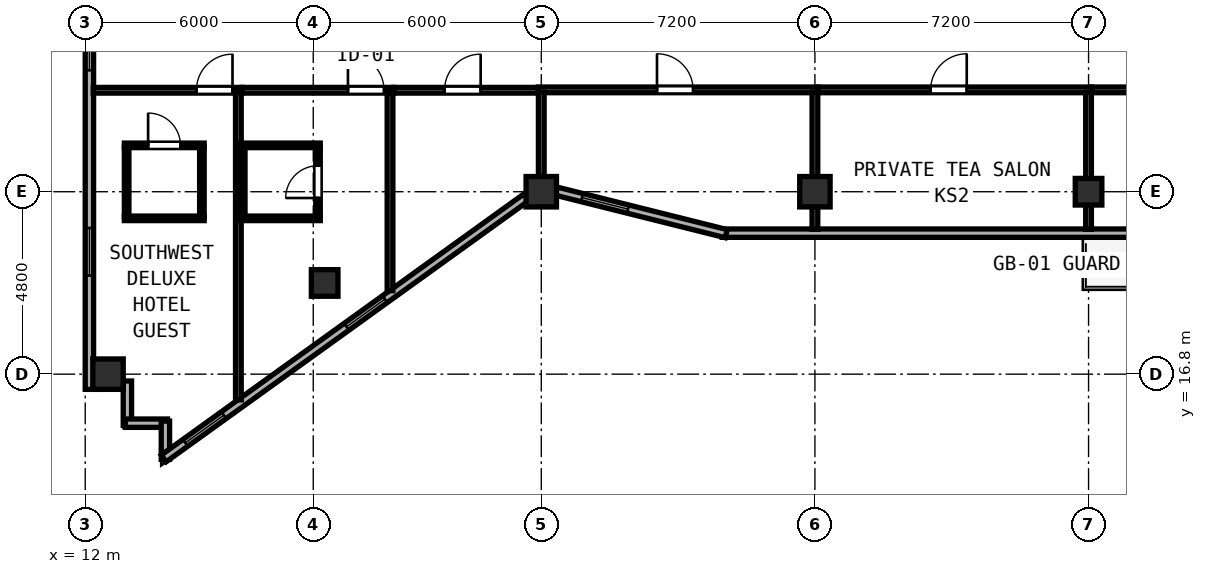
"""IFC4 building model, lengths in metres.
Left out: names, types, materials, properties, quantities, classifications, styles, units other than length and angle.
Written with IfcOpenShell. Run it as: python <this file> out.ifc"""

import sys

from ifc_helpers import new_model, si_unit, direction, frame, frame_2d, origin, origin_2d, place, context, subcontext, project, spatial, rectangle, hollow_rectangle, extrude, element, fill, save


model = new_model("IFC4")
c1 = context("Model", 3, precision=1e-05, world=origin(), true_north=direction((0.0, 1.0)))
c2 = subcontext(c1, "Body", "Model", "MODEL_VIEW")
j1 = project(units=[si_unit("LENGTHUNIT", "METRE"), si_unit("PLANEANGLEUNIT", "RADIAN")], contexts=[c1])
p1 = place(None, origin())
s1 = spatial("IfcSite", under=j1, at=p1, CompositionType="ELEMENT")
p2 = place(p1, origin())
s2 = spatial("IfcBuilding", under=s1, at=p2, CompositionType="ELEMENT")
p3 = place(p2, frame((0.0, 0.0, 269.85)))
s3 = spatial("IfcBuildingStorey", under=s2, at=p3, CompositionType="ELEMENT", Elevation=269.85)
for number, where, z_axis, x_axis in (
    (1, (24.0, 21.6, 0.0), (0.0, 0.0, 1.0), (1.0, 0.0, 0.0)),
    (2, (31.2, 21.6, 0.0), (0.0, 0.0, 1.0), (1.0, 0.0, 0.0)),
    (3, (12.6, 16.8, 0.0), (0.0, 0.0, 1.0), (1.0, 0.0, 0.0)),
):
    element("IfcColumn", number, at=place(p3, frame(where, z_axis=z_axis, x_axis=x_axis)), inside=s3, PredefinedType="COLUMN", context=c2, shape_type="SweptSolid", body=[
        extrude(hollow_rectangle(XDim=0.8, YDim=0.8, WallThickness=0.03, at=origin_2d()), origin(), (0.0, 0.0, 1.0), 3.85),
    ])
for number, where, z_axis, x_axis in (
    (4, (38.4, 21.6, 0.0), (0.0, 0.0, 1.0), (1.0, 0.0, 0.0)),
    (5, (18.3, 19.2, 0.0), (0.0, 0.0, 1.0), (1.0, 0.0, 0.0)),
):
    element("IfcColumn", number, at=place(p3, frame(where, z_axis=z_axis, x_axis=x_axis)), inside=s3, PredefinedType="COLUMN", context=c2, shape_type="SweptSolid", body=[
        extrude(hollow_rectangle(XDim=0.7, YDim=0.7, WallThickness=0.026, at=origin_2d()), origin(), (0.0, 0.0, 1.0), 3.85),
    ])
p4 = place(p3, frame((28.759, 20.51, 0.0), z_axis=(0.0, 0.0, 1.0), x_axis=(1.0, 0.0, 0.0)))
e6 = element("IfcWall", 6, at=p4, inside=s3, PredefinedType="SOLIDWALL", context=c2, shape_type="SweptSolid", body=[
    extrude(rectangle(XDim=19.283, YDim=0.22, at=frame_2d((9.642, 0.0))), origin(), (0.0, 0.0, 1.0), 3.67),
])
p5 = place(p4, frame((15.641, 0.0, 0.0), z_axis=(0.0, 0.0, 1.0), x_axis=(-1.0, 0.0, 0.0)))
e7 = element("IfcOpeningElement", 7, at=p5, cuts=e6, PredefinedType="OPENING", context=c2, shape_type="SweptSolid", body=[
    extrude(rectangle(XDim=1.2, YDim=2.15, at=frame_2d((0.6, 1.075))), frame((0.0, 0.12, 0.0), z_axis=(0.0, -1.0, 0.0), x_axis=(1.0, 0.0, 0.0)), (0.0, 0.0, 1.0), 0.24),
])
p6 = place(p3, frame((12.11, 37.545, 0.0), z_axis=(0.0, 0.0, 1.0), x_axis=(0.0, -1.0, 0.0)))
e8 = element("IfcWall", 8, at=p6, inside=s3, PredefinedType="SOLIDWALL", context=c2, shape_type="SweptSolid", body=[
    extrude(rectangle(XDim=21.145, YDim=0.22, at=frame_2d((10.573, 0.0))), origin(), (0.0, 0.0, 1.0), 3.67),
])
p7 = place(p6, frame((0.7, 0.0, 0.85)))
e9 = element("IfcOpeningElement", 9, at=p7, cuts=e8, PredefinedType="OPENING", context=c2, shape_type="SweptSolid", body=[
    extrude(rectangle(XDim=1.25, YDim=1.95, at=frame_2d((0.625, 0.975))), frame((0.0, 0.12, 0.0), z_axis=(0.0, -1.0, 0.0), x_axis=(1.0, 0.0, 0.0)), (0.0, 0.0, 1.0), 0.24),
])
p8 = place(p6, frame((6.1, 0.0, 0.85)))
e10 = element("IfcOpeningElement", 10, at=p8, cuts=e8, PredefinedType="OPENING", context=c2, shape_type="SweptSolid", body=[
    extrude(rectangle(XDim=1.25, YDim=1.95, at=frame_2d((0.625, 0.975))), frame((0.0, 0.12, 0.0), z_axis=(0.0, -1.0, 0.0), x_axis=(1.0, 0.0, 0.0)), (0.0, 0.0, 1.0), 0.24),
])
p9 = place(p6, frame((11.5, 0.0, 0.85)))
e11 = element("IfcOpeningElement", 11, at=p9, cuts=e8, PredefinedType="OPENING", context=c2, shape_type="SweptSolid", body=[
    extrude(rectangle(XDim=1.25, YDim=1.95, at=frame_2d((0.625, 0.975))), frame((0.0, 0.12, 0.0), z_axis=(0.0, -1.0, 0.0), x_axis=(1.0, 0.0, 0.0)), (0.0, 0.0, 1.0), 0.24),
])
p10 = place(p6, frame((16.9, 0.0, 0.85)))
e12 = element("IfcOpeningElement", 12, at=p10, cuts=e8, PredefinedType="OPENING", context=c2, shape_type="SweptSolid", body=[
    extrude(rectangle(XDim=1.25, YDim=1.95, at=frame_2d((0.625, 0.975))), frame((0.0, 0.12, 0.0), z_axis=(0.0, -1.0, 0.0), x_axis=(1.0, 0.0, 0.0)), (0.0, 0.0, 1.0), 0.24),
])
p11 = place(p3, frame((13.11, 16.62, 0.0), z_axis=(0.0, 0.0, 1.0), x_axis=(0.0, -1.0, 0.0)))
e13 = element("IfcWall", 13, at=p11, inside=s3, PredefinedType="SOLIDWALL", context=c2, shape_type="SweptSolid", body=[
    extrude(rectangle(XDim=1.165, YDim=0.22, at=frame_2d((0.583, 0.0))), origin(), (0.0, 0.0, 1.0), 3.67),
])
p12 = place(p3, frame((13.055, 15.51, 0.0), z_axis=(0.0, 0.0, 1.0), x_axis=(1.0, 0.0, 0.0)))
e14 = element("IfcWall", 14, at=p12, inside=s3, PredefinedType="SOLIDWALL", context=c2, shape_type="SweptSolid", body=[
    extrude(rectangle(XDim=1.11, YDim=0.22, at=frame_2d((0.555, 0.0))), origin(), (0.0, 0.0, 1.0), 3.67),
])
p13 = place(p3, frame((14.11, 15.565, 0.0), z_axis=(0.0, 0.0, 1.0), x_axis=(0.0, -1.0, 0.0)))
e15 = element("IfcWall", 15, at=p13, inside=s3, PredefinedType="SOLIDWALL", context=c2, shape_type="SweptSolid", body=[
    extrude(rectangle(XDim=1.005, YDim=0.22, at=frame_2d((0.502, 0.0))), origin(), (0.0, 0.0, 1.0), 3.67),
])
p14 = place(p3, frame((14.065, 14.583, 0.0), z_axis=(0.0, 0.0, 1.0), x_axis=(0.811523708458, 0.584319493608, 0.0)))
e16 = element("IfcWall", 16, at=p14, inside=s3, PredefinedType="SOLIDWALL", context=c2, shape_type="SweptSolid", body=[
    extrude(rectangle(XDim=11.759, YDim=0.22, at=frame_2d((5.879, 0.0))), origin(), (0.0, 0.0, 1.0), 3.315),
])
p15 = place(p14, frame((0.7, 0.0, 0.85)))
e17 = element("IfcOpeningElement", 17, at=p15, cuts=e16, PredefinedType="OPENING", context=c2, shape_type="SweptSolid", body=[
    extrude(rectangle(XDim=1.25, YDim=1.95, at=frame_2d((0.625, 0.975))), frame((0.0, 0.12, 0.0), z_axis=(0.0, -1.0, 0.0), x_axis=(1.0, 0.0, 0.0)), (0.0, 0.0, 1.0), 0.24),
])
p16 = place(p14, frame((5.926, 0.0, 0.85)))
e18 = element("IfcOpeningElement", 18, at=p16, cuts=e16, PredefinedType="OPENING", context=c2, shape_type="SweptSolid", body=[
    extrude(rectangle(XDim=1.25, YDim=1.95, at=frame_2d((0.625, 0.975))), frame((0.0, 0.12, 0.0), z_axis=(0.0, -1.0, 0.0), x_axis=(1.0, 0.0, 0.0)), (0.0, 0.0, 1.0), 0.24),
])
p17 = place(p3, frame((24.392, 21.615, 0.0), z_axis=(0.0, 0.0, 1.0), x_axis=(0.970133159038, -0.242572986408, 0.0)))
e19 = element("IfcWall", 19, at=p17, inside=s3, PredefinedType="SOLIDWALL", context=c2, shape_type="SweptSolid", body=[
    extrude(rectangle(XDim=4.613, YDim=0.22, at=frame_2d((2.306, 0.0))), origin(), (0.0, 0.0, 1.0), 3.315),
])
p18 = place(p17, frame((0.7, 0.0, 0.85)))
e20 = element("IfcOpeningElement", 20, at=p18, cuts=e19, PredefinedType="OPENING", context=c2, shape_type="SweptSolid", body=[
    extrude(rectangle(XDim=1.25, YDim=1.95, at=frame_2d((0.625, 0.975))), frame((0.0, 0.12, 0.0), z_axis=(0.0, -1.0, 0.0), x_axis=(1.0, 0.0, 0.0)), (0.0, 0.0, 1.0), 0.24),
])
p19 = place(p3, frame((23.92, 24.28, 0.0), z_axis=(0.0, 0.0, 1.0), x_axis=(1.0, 0.0, 0.0)))
e21 = element("IfcWall", 21, at=p19, inside=s3, PredefinedType="PARTITIONING", context=c2, shape_type="SweptSolid", body=[
    extrude(rectangle(XDim=7.36, YDim=0.15, at=frame_2d((3.68, 0.0))), origin(), (0.0, 0.0, 1.0), 3.67),
])
p20 = place(p19, frame((4.075, 0.0, 0.0), z_axis=(0.0, 0.0, 1.0), x_axis=(-1.0, 0.0, 0.0)))
e22 = element("IfcOpeningElement", 22, at=p20, cuts=e21, PredefinedType="OPENING", context=c2, shape_type="SweptSolid", body=[
    extrude(rectangle(XDim=0.95, YDim=2.12, at=frame_2d((0.475, 1.06))), frame((0.0, 0.085, 0.0), z_axis=(0.0, -1.0, 0.0), x_axis=(1.0, 0.0, 0.0)), (0.0, 0.0, 1.0), 0.17),
])
p21 = place(p3, frame((24.0, 21.819, 0.0), z_axis=(0.0, 0.0, 1.0), x_axis=(0.0, 1.0, 0.0)))
e23 = element("IfcWall", 23, at=p21, inside=s3, PredefinedType="PARTITIONING", context=c2, shape_type="SweptSolid", body=[
    extrude(rectangle(XDim=2.401, YDim=0.15, at=frame_2d((1.201, 0.0))), origin(), (0.0, 0.0, 1.0), 3.315),
])
p22 = place(p3, frame((31.2, 20.612, 0.0), z_axis=(0.0, 0.0, 1.0), x_axis=(0.0, 1.0, 0.0)))
e24 = element("IfcWall", 24, at=p22, inside=s3, PredefinedType="PARTITIONING", context=c2, shape_type="SweptSolid", body=[
    extrude(rectangle(XDim=3.608, YDim=0.15, at=frame_2d((1.804, 0.0))), origin(), (0.0, 0.0, 1.0), 3.155),
])
p23 = place(p3, frame((31.282, 24.28, 0.0), z_axis=(0.0, 0.0, 1.0), x_axis=(1.0, 0.0, 0.0)))
e25 = element("IfcWall", 25, at=p23, inside=s3, PredefinedType="PARTITIONING", context=c2, shape_type="SweptSolid", body=[
    extrude(rectangle(XDim=7.198, YDim=0.15, at=frame_2d((3.599, 0.0))), origin(), (0.0, 0.0, 1.0), 3.67),
])
p24 = place(p23, frame((3.913, 0.0, 0.0), z_axis=(0.0, 0.0, 1.0), x_axis=(-1.0, 0.0, 0.0)))
e26 = element("IfcOpeningElement", 26, at=p24, cuts=e25, PredefinedType="OPENING", context=c2, shape_type="SweptSolid", body=[
    extrude(rectangle(XDim=0.95, YDim=2.12, at=frame_2d((0.475, 1.06))), frame((0.0, 0.085, 0.0), z_axis=(0.0, -1.0, 0.0), x_axis=(1.0, 0.0, 0.0)), (0.0, 0.0, 1.0), 0.17),
])
p25 = place(p3, frame((38.4, 20.612, 0.0), z_axis=(0.0, 0.0, 1.0), x_axis=(0.0, 1.0, 0.0)))
e27 = element("IfcWall", 27, at=p25, inside=s3, PredefinedType="PARTITIONING", context=c2, shape_type="SweptSolid", body=[
    extrude(rectangle(XDim=3.608, YDim=0.15, at=frame_2d((1.804, 0.0))), origin(), (0.0, 0.0, 1.0), 3.155),
])
p26 = place(p3, frame((38.482, 24.28, 0.0), z_axis=(0.0, 0.0, 1.0), x_axis=(1.0, 0.0, 0.0)))
e28 = element("IfcWall", 28, at=p26, inside=s3, PredefinedType="PARTITIONING", context=c2, shape_type="SweptSolid", body=[
    extrude(rectangle(XDim=14.106, YDim=0.15, at=frame_2d((7.053, 0.0))), origin(), (0.0, 0.0, 1.0), 3.67),
])
p27 = place(p26, frame((5.618, 0.0, 0.0), z_axis=(0.0, 0.0, 1.0), x_axis=(-1.0, 0.0, 0.0)))
e29 = element("IfcOpeningElement", 29, at=p27, cuts=e28, PredefinedType="OPENING", context=c2, shape_type="SweptSolid", body=[
    extrude(rectangle(XDim=0.95, YDim=2.12, at=frame_2d((0.475, 1.06))), frame((0.0, 0.085, 0.0), z_axis=(0.0, -1.0, 0.0), x_axis=(1.0, 0.0, 0.0)), (0.0, 0.0, 1.0), 0.17),
])
p28 = place(p3, frame((12.212, 24.27, 0.0), z_axis=(0.0, 0.0, 1.0), x_axis=(1.0, 0.0, 0.0)))
e30 = element("IfcWall", 30, at=p28, inside=s3, PredefinedType="PARTITIONING", context=c2, shape_type="SweptSolid", body=[
    extrude(rectangle(XDim=3.918, YDim=0.15, at=frame_2d((1.959, 0.0))), origin(), (0.0, 0.0, 1.0), 3.67),
])
p29 = place(p28, frame((3.663, 0.0, 0.0), z_axis=(0.0, 0.0, 1.0), x_axis=(-1.0, 0.0, 0.0)))
e31 = element("IfcOpeningElement", 31, at=p29, cuts=e30, PredefinedType="OPENING", context=c2, shape_type="SweptSolid", body=[
    extrude(rectangle(XDim=0.95, YDim=2.15, at=frame_2d((0.475, 1.075))), frame((0.0, 0.085, 0.0), z_axis=(0.0, -1.0, 0.0), x_axis=(1.0, 0.0, 0.0)), (0.0, 0.0, 1.0), 0.17),
])
p30 = place(p3, frame((16.03, 16.123, 0.0), z_axis=(0.0, 0.0, 1.0), x_axis=(0.0, 1.0, 0.0)))
e32 = element("IfcWall", 32, at=p30, inside=s3, PredefinedType="PARTITIONING", context=c2, shape_type="SweptSolid", body=[
    extrude(rectangle(XDim=8.087, YDim=0.15, at=frame_2d((4.043, 0.0))), origin(), (0.0, 0.0, 1.0), 3.67),
])
p31 = place(p3, frame((13.03, 22.82, 0.0), z_axis=(0.0, 0.0, 1.0), x_axis=(1.0, 0.0, 0.0)))
e33 = element("IfcWall", 33, at=p31, inside=s3, PredefinedType="PARTITIONING", context=c2, shape_type="SweptSolid", body=[
    extrude(rectangle(XDim=2.1, YDim=0.12, at=frame_2d((1.05, 0.0))), origin(), (0.0, 0.0, 1.0), 3.67),
])
p32 = place(p31, frame((1.475, 0.0, 0.0), z_axis=(0.0, 0.0, 1.0), x_axis=(-1.0, 0.0, 0.0)))
e34 = element("IfcOpeningElement", 34, at=p32, cuts=e33, PredefinedType="OPENING", context=c2, shape_type="SweptSolid", body=[
    extrude(rectangle(XDim=0.85, YDim=2.1, at=frame_2d((0.425, 1.05))), frame((0.0, 0.07, 0.0), z_axis=(0.0, -1.0, 0.0), x_axis=(1.0, 0.0, 0.0)), (0.0, 0.0, 1.0), 0.14),
])
p33 = place(p3, frame((13.03, 20.9, 0.0), z_axis=(0.0, 0.0, 1.0), x_axis=(1.0, 0.0, 0.0)))
e35 = element("IfcWall", 35, at=p33, inside=s3, PredefinedType="PARTITIONING", context=c2, shape_type="SweptSolid", body=[
    extrude(rectangle(XDim=2.1, YDim=0.12, at=frame_2d((1.05, 0.0))), origin(), (0.0, 0.0, 1.0), 3.67),
])
for number, where, z_axis, x_axis in (
    (36, (13.09, 20.945, 0.0), (0.0, 0.0, 1.0), (0.0, 1.0, 0.0)),
    (37, (15.07, 20.945, 0.0), (0.0, 0.0, 1.0), (0.0, 1.0, 0.0)),
):
    element("IfcWall", number, at=place(p3, frame(where, z_axis=z_axis, x_axis=x_axis)), inside=s3, PredefinedType="PARTITIONING", context=c2, shape_type="SweptSolid", body=[
        extrude(rectangle(XDim=1.83, YDim=0.12, at=frame_2d((0.915, 0.0))), origin(), (0.0, 0.0, 1.0), 3.67),
    ])
p34 = place(p3, frame((16.132, 24.27, 0.0), z_axis=(0.0, 0.0, 1.0), x_axis=(1.0, 0.0, 0.0)))
e38 = element("IfcWall", 38, at=p34, inside=s3, PredefinedType="PARTITIONING", context=c2, shape_type="SweptSolid", body=[
    extrude(rectangle(XDim=3.988, YDim=0.15, at=frame_2d((1.994, 0.0))), origin(), (0.0, 0.0, 1.0), 3.67),
])
p35 = place(p34, frame((3.731, 0.0, 0.0), z_axis=(0.0, 0.0, 1.0), x_axis=(-1.0, 0.0, 0.0)))
e39 = element("IfcOpeningElement", 39, at=p35, cuts=e38, PredefinedType="OPENING", context=c2, shape_type="SweptSolid", body=[
    extrude(rectangle(XDim=0.95, YDim=2.15, at=frame_2d((0.475, 1.075))), frame((0.0, 0.085, 0.0), z_axis=(0.0, -1.0, 0.0), x_axis=(1.0, 0.0, 0.0)), (0.0, 0.0, 1.0), 0.17),
])
p36 = place(p3, frame((20.02, 18.996, 0.0), z_axis=(0.0, 0.0, 1.0), x_axis=(0.0, 1.0, 0.0)))
e40 = element("IfcWall", 40, at=p36, inside=s3, PredefinedType="PARTITIONING", context=c2, shape_type="SweptSolid", body=[
    extrude(rectangle(XDim=5.214, YDim=0.15, at=frame_2d((2.607, 0.0))), origin(), (0.0, 0.0, 1.0), 3.67),
])
for number, where, z_axis, x_axis in (
    (41, (16.09, 22.82, 0.0), (0.0, 0.0, 1.0), (1.0, 0.0, 0.0)),
    (42, (16.09, 20.9, 0.0), (0.0, 0.0, 1.0), (1.0, 0.0, 0.0)),
):
    element("IfcWall", number, at=place(p3, frame(where, z_axis=z_axis, x_axis=x_axis)), inside=s3, PredefinedType="PARTITIONING", context=c2, shape_type="SweptSolid", body=[
        extrude(rectangle(XDim=2.095, YDim=0.12, at=frame_2d((1.047, 0.0))), origin(), (0.0, 0.0, 1.0), 3.67),
    ])
p37 = place(p3, frame((16.145, 20.945, 0.0), z_axis=(0.0, 0.0, 1.0), x_axis=(0.0, 1.0, 0.0)))
e43 = element("IfcWall", 43, at=p37, inside=s3, PredefinedType="PARTITIONING", context=c2, shape_type="SweptSolid", body=[
    extrude(rectangle(XDim=1.83, YDim=0.12, at=frame_2d((0.915, 0.0))), origin(), (0.0, 0.0, 1.0), 3.67),
])
p38 = place(p3, frame((18.125, 20.945, 0.0), z_axis=(0.0, 0.0, 1.0), x_axis=(0.0, 1.0, 0.0)))
e44 = element("IfcWall", 44, at=p38, inside=s3, PredefinedType="PARTITIONING", context=c2, shape_type="SweptSolid", body=[
    extrude(rectangle(XDim=1.83, YDim=0.12, at=frame_2d((0.915, 0.0))), origin(), (0.0, 0.0, 1.0), 3.67),
])
p39 = place(p38, frame((0.49, 0.0, 0.0)))
e45 = element("IfcOpeningElement", 45, at=p39, cuts=e44, PredefinedType="OPENING", context=c2, shape_type="SweptSolid", body=[
    extrude(rectangle(XDim=0.85, YDim=2.1, at=frame_2d((0.425, 1.05))), frame((0.0, 0.07, 0.0), z_axis=(0.0, -1.0, 0.0), x_axis=(1.0, 0.0, 0.0)), (0.0, 0.0, 1.0), 0.14),
])
p40 = place(p3, frame((20.122, 24.27, 0.0), z_axis=(0.0, 0.0, 1.0), x_axis=(1.0, 0.0, 0.0)))
e46 = element("IfcWall", 46, at=p40, inside=s3, PredefinedType="PARTITIONING", context=c2, shape_type="SweptSolid", body=[
    extrude(rectangle(XDim=3.796, YDim=0.15, at=frame_2d((1.898, 0.0))), origin(), (0.0, 0.0, 1.0), 3.67),
])
p41 = place(p40, frame((2.283, 0.0, 0.0), z_axis=(0.0, 0.0, 1.0), x_axis=(-1.0, 0.0, 0.0)))
e47 = element("IfcOpeningElement", 47, at=p41, cuts=e46, PredefinedType="OPENING", context=c2, shape_type="SweptSolid", body=[
    extrude(rectangle(XDim=0.95, YDim=2.12, at=frame_2d((0.475, 1.06))), frame((0.0, 0.085, 0.0), z_axis=(0.0, -1.0, 0.0), x_axis=(1.0, 0.0, 0.0)), (0.0, 0.0, 1.0), 0.17),
])
p42 = place(p9, origin())
e48 = element("IfcWindow", 48, at=p42, inside=s3, PartitioningType="SINGLE_PANEL", PredefinedType="WINDOW", context=c2, shape_type="SweptSolid", body=[
    extrude(rectangle(XDim=1.25, YDim=1.95, at=frame_2d((0.625, 0.975))), frame((0.0, 0.03, 0.0), z_axis=(0.0, -1.0, 0.0), x_axis=(1.0, 0.0, 0.0)), (0.0, 0.0, 1.0), 0.06),
])
fill(e11, e48)
p43 = place(p10, origin())
e49 = element("IfcWindow", 49, at=p43, inside=s3, PartitioningType="SINGLE_PANEL", PredefinedType="WINDOW", context=c2, shape_type="SweptSolid", body=[
    extrude(rectangle(XDim=1.25, YDim=1.95, at=frame_2d((0.625, 0.975))), frame((0.0, 0.03, 0.0), z_axis=(0.0, -1.0, 0.0), x_axis=(1.0, 0.0, 0.0)), (0.0, 0.0, 1.0), 0.06),
])
fill(e12, e49)
p44 = place(p15, origin())
e50 = element("IfcWindow", 50, at=p44, inside=s3, PartitioningType="SINGLE_PANEL", PredefinedType="WINDOW", context=c2, shape_type="SweptSolid", body=[
    extrude(rectangle(XDim=1.25, YDim=1.95, at=frame_2d((0.625, 0.975))), frame((0.0, 0.03, 0.0), z_axis=(0.0, -1.0, 0.0), x_axis=(1.0, 0.0, 0.0)), (0.0, 0.0, 1.0), 0.06),
])
fill(e17, e50)
p45 = place(p16, origin())
e51 = element("IfcWindow", 51, at=p45, inside=s3, PartitioningType="SINGLE_PANEL", PredefinedType="WINDOW", context=c2, shape_type="SweptSolid", body=[
    extrude(rectangle(XDim=1.25, YDim=1.95, at=frame_2d((0.625, 0.975))), frame((0.0, 0.03, 0.0), z_axis=(0.0, -1.0, 0.0), x_axis=(1.0, 0.0, 0.0)), (0.0, 0.0, 1.0), 0.06),
])
fill(e18, e51)
p46 = place(p18, origin())
e52 = element("IfcWindow", 52, at=p46, inside=s3, PartitioningType="SINGLE_PANEL", PredefinedType="WINDOW", context=c2, shape_type="SweptSolid", body=[
    extrude(rectangle(XDim=1.25, YDim=1.95, at=frame_2d((0.625, 0.975))), frame((0.0, 0.03, 0.0), z_axis=(0.0, -1.0, 0.0), x_axis=(1.0, 0.0, 0.0)), (0.0, 0.0, 1.0), 0.06),
])
fill(e20, e52)
p47 = place(p20, origin())
e53 = element("IfcDoor", 53, at=p47, inside=s3, OperationType="SINGLE_SWING_RIGHT", PredefinedType="DOOR", context=c2, shape_type="SweptSolid", body=[
    extrude(rectangle(XDim=0.95, YDim=2.12, at=frame_2d((0.475, 1.06))), frame((0.0, 0.025, 0.0), z_axis=(0.0, -1.0, 0.0), x_axis=(1.0, 0.0, 0.0)), (0.0, 0.0, 1.0), 0.05),
])
fill(e22, e53)
p48 = place(p24, origin())
e54 = element("IfcDoor", 54, at=p48, inside=s3, OperationType="SINGLE_SWING_LEFT", PredefinedType="DOOR", context=c2, shape_type="SweptSolid", body=[
    extrude(rectangle(XDim=0.95, YDim=2.12, at=frame_2d((0.475, 1.06))), frame((0.0, 0.025, 0.0), z_axis=(0.0, -1.0, 0.0), x_axis=(1.0, 0.0, 0.0)), (0.0, 0.0, 1.0), 0.05),
])
fill(e26, e54)
p49 = place(p29, origin())
e55 = element("IfcDoor", 55, at=p49, inside=s3, OperationType="SINGLE_SWING_LEFT", PredefinedType="DOOR", context=c2, shape_type="SweptSolid", body=[
    extrude(rectangle(XDim=0.95, YDim=2.15, at=frame_2d((0.475, 1.075))), frame((0.0, 0.025, 0.0), z_axis=(0.0, -1.0, 0.0), x_axis=(1.0, 0.0, 0.0)), (0.0, 0.0, 1.0), 0.05),
])
fill(e31, e55)
p50 = place(p32, origin())
e56 = element("IfcDoor", 56, at=p50, inside=s3, OperationType="SINGLE_SWING_RIGHT", PredefinedType="DOOR", context=c2, shape_type="SweptSolid", body=[
    extrude(rectangle(XDim=0.85, YDim=2.1, at=frame_2d((0.425, 1.05))), frame((0.0, 0.025, 0.0), z_axis=(0.0, -1.0, 0.0), x_axis=(1.0, 0.0, 0.0)), (0.0, 0.0, 1.0), 0.05),
])
fill(e34, e56)
p51 = place(p35, origin())
e57 = element("IfcDoor", 57, at=p51, inside=s3, OperationType="SINGLE_SWING_RIGHT", PredefinedType="DOOR", context=c2, shape_type="SweptSolid", body=[
    extrude(rectangle(XDim=0.95, YDim=2.15, at=frame_2d((0.475, 1.075))), frame((0.0, 0.025, 0.0), z_axis=(0.0, -1.0, 0.0), x_axis=(1.0, 0.0, 0.0)), (0.0, 0.0, 1.0), 0.05),
])
fill(e39, e57)
p52 = place(p39, origin())
e58 = element("IfcDoor", 58, at=p52, inside=s3, OperationType="SINGLE_SWING_LEFT", PredefinedType="DOOR", context=c2, shape_type="SweptSolid", body=[
    extrude(rectangle(XDim=0.85, YDim=2.1, at=frame_2d((0.425, 1.05))), frame((0.0, 0.025, 0.0), z_axis=(0.0, -1.0, 0.0), x_axis=(1.0, 0.0, 0.0)), (0.0, 0.0, 1.0), 0.05),
])
fill(e45, e58)
p53 = place(p41, origin())
e59 = element("IfcDoor", 59, at=p53, inside=s3, OperationType="SINGLE_SWING_LEFT", PredefinedType="DOOR", context=c2, shape_type="SweptSolid", body=[
    extrude(rectangle(XDim=0.95, YDim=2.12, at=frame_2d((0.475, 1.06))), frame((0.0, 0.025, 0.0), z_axis=(0.0, -1.0, 0.0), x_axis=(1.0, 0.0, 0.0)), (0.0, 0.0, 1.0), 0.05),
])
fill(e47, e59)
save(model, sys.argv[1])
